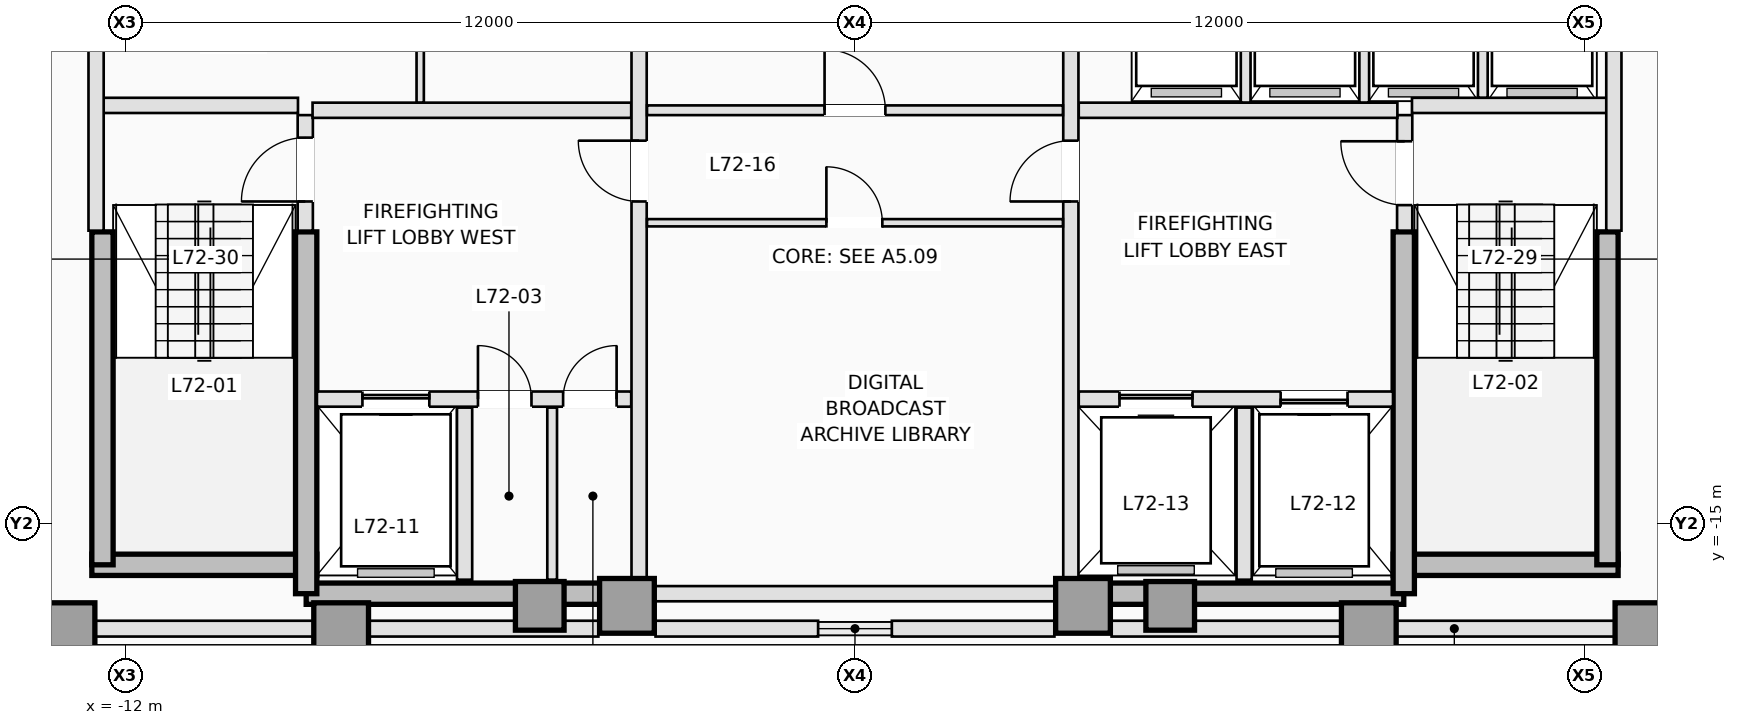
"""IFC4 building model, lengths in metres.
Left out: names, types, materials, properties, quantities, classifications, styles, units other than length and angle.
Written with IfcOpenShell. Run it as: python <this file> out.ifc"""

import sys

from ifc_helpers import new_model, si_unit, direction, frame, frame_2d, origin, origin_2d, place, context, subcontext, project, spatial, rectangle, extrude, element, fill, save


model = new_model("IFC4")
c1 = context("Model", 3, precision=1e-05, world=origin(), true_north=direction((0.0, 1.0)))
c2 = subcontext(c1, "Body", "Model", "MODEL_VIEW")
j1 = project(units=[si_unit("LENGTHUNIT", "METRE"), si_unit("PLANEANGLEUNIT", "RADIAN")], contexts=[c1])
p1 = place(None, origin())
s1 = spatial("IfcSite", under=j1, at=p1, CompositionType="ELEMENT")
p2 = place(p1, origin())
s2 = spatial("IfcBuilding", under=s1, at=p2, CompositionType="ELEMENT")
p3 = place(p2, frame((0.0, 0.0, 260.4)))
s3 = spatial("IfcBuildingStorey", under=s2, at=p3, CompositionType="ELEMENT", Elevation=260.4)
p4 = place(p3, frame((-12.55, -15.675, 0.0), z_axis=(0.0, 0.0, 1.0), x_axis=(1.0, 0.0, 0.0)))
e1 = element("IfcWall", 1, at=p4, inside=s3, PredefinedType="SHEAR", context=c2, shape_type="SweptSolid", body=[
    extrude(rectangle(XDim=3.7, YDim=0.35, at=frame_2d((1.85, 0.0))), origin(), (0.0, 0.0, 1.0), 3.5),
])
for number, where, z_axis, x_axis in (
    (2, (-9.025, -16.15, 0.0), (0.0, 0.0, 1.0), (1.0, 0.0, 0.0)),
    (3, (3.75, -16.15, 0.0), (0.0, 0.0, 1.0), (1.0, 0.0, 0.0)),
):
    element("IfcWall", number, at=place(p3, frame(where, z_axis=z_axis, x_axis=x_axis)), inside=s3, PredefinedType="SHEAR", context=c2, shape_type="SweptSolid", body=[
        extrude(rectangle(XDim=5.275, YDim=0.35, at=frame_2d((2.637, 0.0))), origin(), (0.0, 0.0, 1.0), 3.5),
    ])
p5 = place(p3, frame((8.85, -15.675, 0.0), z_axis=(0.0, 0.0, 1.0), x_axis=(1.0, 0.0, 0.0)))
e4 = element("IfcWall", 4, at=p5, inside=s3, PredefinedType="SHEAR", context=c2, shape_type="SweptSolid", body=[
    extrude(rectangle(XDim=3.7, YDim=0.35, at=frame_2d((1.85, 0.0))), origin(), (0.0, 0.0, 1.0), 3.5),
])
for number, where, z_axis, x_axis in (
    (5, (-12.375, -15.675, 0.0), (0.0, 0.0, 1.0), (0.0, 1.0, 0.0)),
    (6, (12.375, -15.675, 0.0), (0.0, 0.0, 1.0), (0.0, 1.0, 0.0)),
):
    element("IfcWall", number, at=place(p3, frame(where, z_axis=z_axis, x_axis=x_axis)), inside=s3, PredefinedType="SHEAR", context=c2, shape_type="SweptSolid", body=[
        extrude(rectangle(XDim=5.475, YDim=0.35, at=frame_2d((2.738, 0.0))), origin(), (0.0, 0.0, 1.0), 3.5),
    ])
for number, where, z_axis, x_axis in (
    (7, (-9.025, -16.15, 0.0), (0.0, 0.0, 1.0), (0.0, 1.0, 0.0)),
    (8, (9.025, -16.15, 0.0), (0.0, 0.0, 1.0), (0.0, 1.0, 0.0)),
):
    element("IfcWall", number, at=place(p3, frame(where, z_axis=z_axis, x_axis=x_axis)), inside=s3, PredefinedType="SHEAR", context=c2, shape_type="SweptSolid", body=[
        extrude(rectangle(XDim=5.95, YDim=0.35, at=frame_2d((2.975, 0.0))), origin(), (0.0, 0.0, 1.0), 3.5),
    ])
for number, where, z_axis, x_axis in (
    (9, (-12.95, -16.75, 0.0), (0.0, 0.0, 1.0), (1.0, 0.0, 0.0)),
    (10, (-8.45, -16.75, 0.0), (0.0, 0.0, 1.0), (1.0, 0.0, 0.0)),
    (11, (-3.75, -16.35, 0.0), (0.0, 0.0, 1.0), (1.0, 0.0, 0.0)),
    (12, (3.75, -16.35, 0.0), (0.0, 0.0, 1.0), (1.0, 0.0, 0.0)),
    (13, (8.45, -16.75, 0.0), (0.0, 0.0, 1.0), (1.0, 0.0, 0.0)),
    (14, (12.95, -16.75, 0.0), (0.0, 0.0, 1.0), (1.0, 0.0, 0.0)),
):
    element("IfcColumn", number, at=place(p3, frame(where, z_axis=z_axis, x_axis=x_axis)), inside=s3, PredefinedType="COLUMN", context=c2, shape_type="SweptSolid", body=[
        extrude(rectangle(XDim=0.9, YDim=0.9, at=origin_2d()), origin(), (0.0, 0.0, 1.0), 3.5),
    ])
for number, where, z_axis, x_axis in (
    (15, (-5.184, -16.35, 0.0), (0.0, 0.0, 1.0), (0.0, 1.0, 0.0)),
    (16, (5.184, -16.35, 0.0), (0.0, 0.0, 1.0), (0.0, 1.0, 0.0)),
):
    element("IfcColumn", number, at=place(p3, frame(where, z_axis=z_axis, x_axis=x_axis)), inside=s3, PredefinedType="COLUMN", context=c2, shape_type="SweptSolid", body=[
        extrude(rectangle(XDim=0.8, YDim=0.8, at=origin_2d()), origin(), (0.0, 0.0, 1.0), 3.5),
    ])
for number, where, z_axis, x_axis in (
    (17, (15.493, -16.725, 0.0), (0.0, 0.0, 1.0), (-1.0, 0.0, 0.0)),
    (18, (-4.22, -16.725, 0.0), (0.0, 0.0, 1.0), (-1.0, 0.0, 0.0)),
):
    element("IfcWall", number, at=place(p3, frame(where, z_axis=z_axis, x_axis=x_axis)), inside=s3, PredefinedType="STANDARD", context=c2, shape_type="SweptSolid", body=[
        extrude(rectangle(XDim=11.273, YDim=0.26, at=frame_2d((5.636, 0.0))), origin(), (0.0, 0.0, 1.0), 2.79),
    ])
for number, where, z_axis, x_axis in (
    (19, (3.28, -16.725, 0.0), (0.0, 0.0, 1.0), (-1.0, 0.0, 0.0)),
    (20, (-0.606, -16.725, 0.0), (0.0, 0.0, 1.0), (-1.0, 0.0, 0.0)),
):
    element("IfcWall", number, at=place(p3, frame(where, z_axis=z_axis, x_axis=x_axis)), inside=s3, PredefinedType="STANDARD", context=c2, shape_type="SweptSolid", body=[
        extrude(rectangle(XDim=2.674, YDim=0.26, at=frame_2d((1.337, 0.0))), origin(), (0.0, 0.0, 1.0), 3.25),
    ])
p6 = place(p3, frame((-9.04, -10.18, 0.0), z_axis=(0.0, 0.0, 1.0), x_axis=(0.0, 1.0, 0.0)))
e21 = element("IfcWall", 21, at=p6, inside=s3, PredefinedType="PARTITIONING", context=c2, shape_type="SweptSolid", body=[
    extrude(rectangle(XDim=1.9, YDim=0.25, at=frame_2d((0.95, 0.0))), origin(), (0.0, 0.0, 1.0), 3.25),
])
p7 = place(p6, frame((0.48, 0.0, 0.0)))
e22 = element("IfcOpeningElement", 22, at=p7, cuts=e21, PredefinedType="OPENING", context=c2, shape_type="SweptSolid", body=[
    extrude(rectangle(XDim=1.05, YDim=2.15, at=frame_2d((0.525, 1.075))), frame((0.0, 0.135, 0.0), z_axis=(0.0, -1.0, 0.0), x_axis=(1.0, 0.0, 0.0)), (0.0, 0.0, 1.0), 0.27),
])
p8 = place(p3, frame((9.04, -10.18, 0.0), z_axis=(0.0, 0.0, 1.0), x_axis=(0.0, 1.0, 0.0)))
e23 = element("IfcWall", 23, at=p8, inside=s3, PredefinedType="PARTITIONING", context=c2, shape_type="SweptSolid", body=[
    extrude(rectangle(XDim=1.9, YDim=0.25, at=frame_2d((0.95, 0.0))), origin(), (0.0, 0.0, 1.0), 3.25),
])
p9 = place(p8, frame((0.42, 0.0, 0.0)))
e24 = element("IfcOpeningElement", 24, at=p9, cuts=e23, PredefinedType="OPENING", context=c2, shape_type="SweptSolid", body=[
    extrude(rectangle(XDim=1.05, YDim=2.15, at=frame_2d((0.525, 1.075))), frame((0.0, 0.135, 0.0), z_axis=(0.0, -1.0, 0.0), x_axis=(1.0, 0.0, 0.0)), (0.0, 0.0, 1.0), 0.27),
])
for number, where, z_axis, x_axis in (
    (25, (-12.38, -8.12, 0.0), (0.0, 0.0, 1.0), (1.0, 0.0, 0.0)),
    (26, (9.16, -8.12, 0.0), (0.0, 0.0, 1.0), (1.0, 0.0, 0.0)),
):
    element("IfcWall", number, at=place(p3, frame(where, z_axis=z_axis, x_axis=x_axis)), inside=s3, PredefinedType="PARTITIONING", context=c2, shape_type="SweptSolid", body=[
        extrude(rectangle(XDim=3.22, YDim=0.25, at=frame_2d((1.61, 0.0))), origin(), (0.0, 0.0, 1.0), 3.25),
    ])
for number, where, z_axis, x_axis in (
    (27, (-12.48, -10.18, 0.0), (0.0, 0.0, 1.0), (0.0, 1.0, 0.0)),
    (28, (12.48, -10.18, 0.0), (0.0, 0.0, 1.0), (0.0, 1.0, 0.0)),
):
    element("IfcWall", number, at=place(p3, frame(where, z_axis=z_axis, x_axis=x_axis)), inside=s3, PredefinedType="PARTITIONING", context=c2, shape_type="SweptSolid", body=[
        extrude(rectangle(XDim=4.84, YDim=0.25, at=frame_2d((2.42, 0.0))), origin(), (0.0, 0.0, 1.0), 3.25),
    ])
p10 = place(p3, frame((-8.848, -12.95, 0.0), z_axis=(0.0, 0.0, 1.0), x_axis=(1.0, 0.0, 0.0)))
e29 = element("IfcWall", 29, at=p10, inside=s3, PredefinedType="PARTITIONING", context=c2, shape_type="SweptSolid", body=[
    extrude(rectangle(XDim=5.168, YDim=0.25, at=frame_2d((2.584, 0.0))), origin(), (0.0, 0.0, 1.0), 3.25),
])
p11 = place(p10, frame((0.748, 0.0, 0.0)))
e30 = element("IfcOpeningElement", 30, at=p11, cuts=e29, PredefinedType="OPENING", context=c2, shape_type="SweptSolid", body=[
    extrude(rectangle(XDim=1.1, YDim=2.15, at=frame_2d((0.55, 1.075))), frame((0.0, 0.135, 0.0), z_axis=(0.0, -1.0, 0.0), x_axis=(1.0, 0.0, 0.0)), (0.0, 0.0, 1.0), 0.27),
])
p12 = place(p10, frame((2.648, 0.0, 0.0)))
e31 = element("IfcOpeningElement", 31, at=p12, cuts=e29, PredefinedType="OPENING", context=c2, shape_type="SweptSolid", body=[
    extrude(rectangle(XDim=0.88, YDim=2.1, at=frame_2d((0.44, 1.05))), frame((0.0, 0.135, 0.0), z_axis=(0.0, -1.0, 0.0), x_axis=(1.0, 0.0, 0.0)), (0.0, 0.0, 1.0), 0.27),
])
p13 = place(p10, frame((4.048, 0.0, 0.0)))
e32 = element("IfcOpeningElement", 32, at=p13, cuts=e29, PredefinedType="OPENING", context=c2, shape_type="SweptSolid", body=[
    extrude(rectangle(XDim=0.88, YDim=2.1, at=frame_2d((0.44, 1.05))), frame((0.0, 0.135, 0.0), z_axis=(0.0, -1.0, 0.0), x_axis=(1.0, 0.0, 0.0)), (0.0, 0.0, 1.0), 0.27),
])
p14 = place(p3, frame((3.68, -12.95, 0.0), z_axis=(0.0, 0.0, 1.0), x_axis=(1.0, 0.0, 0.0)))
e33 = element("IfcWall", 33, at=p14, inside=s3, PredefinedType="PARTITIONING", context=c2, shape_type="SweptSolid", body=[
    extrude(rectangle(XDim=5.168, YDim=0.25, at=frame_2d((2.584, 0.0))), origin(), (0.0, 0.0, 1.0), 3.25),
])
p15 = place(p14, frame((3.32, 0.0, 0.0)))
e34 = element("IfcOpeningElement", 34, at=p15, cuts=e33, PredefinedType="OPENING", context=c2, shape_type="SweptSolid", body=[
    extrude(rectangle(XDim=1.1, YDim=2.15, at=frame_2d((0.55, 1.075))), frame((0.0, 0.135, 0.0), z_axis=(0.0, -1.0, 0.0), x_axis=(1.0, 0.0, 0.0)), (0.0, 0.0, 1.0), 0.27),
])
p16 = place(p14, frame((0.67, 0.0, 0.0)))
e35 = element("IfcOpeningElement", 35, at=p16, cuts=e33, PredefinedType="OPENING", context=c2, shape_type="SweptSolid", body=[
    extrude(rectangle(XDim=1.2, YDim=2.15, at=frame_2d((0.6, 1.075))), frame((0.0, 0.135, 0.0), z_axis=(0.0, -1.0, 0.0), x_axis=(1.0, 0.0, 0.0)), (0.0, 0.0, 1.0), 0.27),
])
p17 = place(p3, frame((-6.42, -15.92, 0.0), z_axis=(0.0, 0.0, 1.0), x_axis=(0.0, 1.0, 0.0)))
e36 = element("IfcWall", 36, at=p17, inside=s3, PredefinedType="PARTITIONING", context=c2, shape_type="SweptSolid", body=[
    extrude(rectangle(XDim=2.83, YDim=0.25, at=frame_2d((1.415, 0.0))), origin(), (0.0, 0.0, 1.0), 3.25),
])
p18 = place(p3, frame((-4.98, -15.92, 0.0), z_axis=(0.0, 0.0, 1.0), x_axis=(0.0, 1.0, 0.0)))
e37 = element("IfcWall", 37, at=p18, inside=s3, PredefinedType="PARTITIONING", context=c2, shape_type="SweptSolid", body=[
    extrude(rectangle(XDim=2.83, YDim=0.16, at=frame_2d((1.415, 0.0))), origin(), (0.0, 0.0, 1.0), 3.25),
])
p19 = place(p3, frame((6.4, -15.92, 0.0), z_axis=(0.0, 0.0, 1.0), x_axis=(0.0, 1.0, 0.0)))
e38 = element("IfcWall", 38, at=p19, inside=s3, PredefinedType="PARTITIONING", context=c2, shape_type="SweptSolid", body=[
    extrude(rectangle(XDim=2.83, YDim=0.25, at=frame_2d((1.415, 0.0))), origin(), (0.0, 0.0, 1.0), 3.25),
])
for number, where, z_axis, x_axis in (
    (39, (-8.92, -8.2, 0.0), (0.0, 0.0, 1.0), (1.0, 0.0, 0.0)),
    (40, (3.68, -8.2, 0.0), (0.0, 0.0, 1.0), (1.0, 0.0, 0.0)),
):
    element("IfcWall", number, at=place(p3, frame(where, z_axis=z_axis, x_axis=x_axis)), inside=s3, PredefinedType="PARTITIONING", context=c2, shape_type="SweptSolid", body=[
        extrude(rectangle(XDim=5.24, YDim=0.25, at=frame_2d((2.62, 0.0))), origin(), (0.0, 0.0, 1.0), 3.25),
    ])
p20 = place(p3, frame((-3.55, -15.898, 0.0), z_axis=(0.0, 0.0, 1.0), x_axis=(0.0, 1.0, 0.0)))
e41 = element("IfcWall", 41, at=p20, inside=s3, PredefinedType="PARTITIONING", context=c2, shape_type="SweptSolid", body=[
    extrude(rectangle(XDim=10.558, YDim=0.25, at=frame_2d((5.279, 0.0))), origin(), (0.0, 0.0, 1.0), 3.25),
])
p21 = place(p20, frame((6.198, 0.0, 0.0)))
e42 = element("IfcOpeningElement", 42, at=p21, cuts=e41, PredefinedType="OPENING", context=c2, shape_type="SweptSolid", body=[
    extrude(rectangle(XDim=1.0, YDim=2.15, at=frame_2d((0.5, 1.075))), frame((0.0, 0.135, 0.0), z_axis=(0.0, -1.0, 0.0), x_axis=(1.0, 0.0, 0.0)), (0.0, 0.0, 1.0), 0.27),
])
p22 = place(p3, frame((3.55, -15.898, 0.0), z_axis=(0.0, 0.0, 1.0), x_axis=(0.0, 1.0, 0.0)))
e43 = element("IfcWall", 43, at=p22, inside=s3, PredefinedType="PARTITIONING", context=c2, shape_type="SweptSolid", body=[
    extrude(rectangle(XDim=10.558, YDim=0.25, at=frame_2d((5.279, 0.0))), origin(), (0.0, 0.0, 1.0), 3.25),
])
p23 = place(p22, frame((6.198, 0.0, 0.0)))
e44 = element("IfcOpeningElement", 44, at=p23, cuts=e43, PredefinedType="OPENING", context=c2, shape_type="SweptSolid", body=[
    extrude(rectangle(XDim=1.0, YDim=2.15, at=frame_2d((0.5, 1.075))), frame((0.0, 0.135, 0.0), z_axis=(0.0, -1.0, 0.0), x_axis=(1.0, 0.0, 0.0)), (0.0, 0.0, 1.0), 0.27),
])
p24 = place(p3, frame((-7.15, -8.073, 0.0), z_axis=(0.0, 0.0, 1.0), x_axis=(0.0, 1.0, 0.0)))
e45 = element("IfcWall", 45, at=p24, inside=s3, PredefinedType="PARTITIONING", context=c2, shape_type="SweptSolid", body=[
    extrude(rectangle(XDim=2.733, YDim=0.12, at=frame_2d((1.366, 0.0))), origin(), (0.0, 0.0, 1.0), 3.25),
])
for number, where, z_axis, x_axis in (
    (46, (6.425, -8.073, 0.0), (0.0, 0.0, 1.0), (0.0, 1.0, 0.0)),
    (47, (8.375, -8.073, 0.0), (0.0, 0.0, 1.0), (0.0, 1.0, 0.0)),
):
    element("IfcWall", number, at=place(p3, frame(where, z_axis=z_axis, x_axis=x_axis)), inside=s3, PredefinedType="PARTITIONING", context=c2, shape_type="SweptSolid", body=[
        extrude(rectangle(XDim=2.733, YDim=0.16, at=frame_2d((1.366, 0.0))), origin(), (0.0, 0.0, 1.0), 3.25),
    ])
p25 = place(p3, frame((10.325, -7.993, 0.0), z_axis=(0.0, 0.0, 1.0), x_axis=(0.0, 1.0, 0.0)))
e48 = element("IfcWall", 48, at=p25, inside=s3, PredefinedType="PARTITIONING", context=c2, shape_type="SweptSolid", body=[
    extrude(rectangle(XDim=2.653, YDim=0.16, at=frame_2d((1.326, 0.0))), origin(), (0.0, 0.0, 1.0), 3.25),
])
p26 = place(p3, frame((-3.298, -16.15, 0.0), z_axis=(0.0, 0.0, 1.0), x_axis=(1.0, 0.0, 0.0)))
e49 = element("IfcWall", 49, at=p26, inside=s3, PredefinedType="PARTITIONING", context=c2, shape_type="SweptSolid", body=[
    extrude(rectangle(XDim=6.596, YDim=0.25, at=frame_2d((3.298, 0.0))), origin(), (0.0, 0.0, 1.0), 2.844),
])
p27 = place(p3, frame((-3.42, -8.2, 0.0), z_axis=(0.0, 0.0, 1.0), x_axis=(1.0, 0.0, 0.0)))
e50 = element("IfcWall", 50, at=p27, inside=s3, PredefinedType="PARTITIONING", context=c2, shape_type="SweptSolid", body=[
    extrude(rectangle(XDim=6.84, YDim=0.16, at=frame_2d((3.42, 0.0))), origin(), (0.0, 0.0, 1.0), 3.25),
])
p28 = place(p27, frame((2.92, 0.0, 0.0)))
e51 = element("IfcOpeningElement", 51, at=p28, cuts=e50, PredefinedType="OPENING", context=c2, shape_type="SweptSolid", body=[
    extrude(rectangle(XDim=1.0, YDim=2.15, at=frame_2d((0.5, 1.075))), frame((0.0, 0.09, 0.0), z_axis=(0.0, -1.0, 0.0), x_axis=(1.0, 0.0, 0.0)), (0.0, 0.0, 1.0), 0.18),
])
p29 = place(p3, frame((-3.42, -10.05, 0.0), z_axis=(0.0, 0.0, 1.0), x_axis=(1.0, 0.0, 0.0)))
e52 = element("IfcWall", 52, at=p29, inside=s3, PredefinedType="PARTITIONING", context=c2, shape_type="SweptSolid", body=[
    extrude(rectangle(XDim=6.84, YDim=0.12, at=frame_2d((3.42, 0.0))), origin(), (0.0, 0.0, 1.0), 3.25),
])
p30 = place(p29, frame((2.95, 0.0, 0.0)))
e53 = element("IfcOpeningElement", 53, at=p30, cuts=e52, PredefinedType="OPENING", context=c2, shape_type="SweptSolid", body=[
    extrude(rectangle(XDim=0.92, YDim=2.12, at=frame_2d((0.46, 1.06))), frame((0.0, 0.07, 0.0), z_axis=(0.0, -1.0, 0.0), x_axis=(1.0, 0.0, 0.0)), (0.0, 0.0, 1.0), 0.14),
])
p31 = place(p11, origin())
e54 = element("IfcDoor", 54, at=p31, inside=s3, OperationType="SLIDING_TO_LEFT", PredefinedType="DOOR", context=c2, shape_type="SweptSolid", body=[
    extrude(rectangle(XDim=1.1, YDim=2.15, at=frame_2d((0.55, 1.075))), frame((0.0, 0.025, 0.0), z_axis=(0.0, -1.0, 0.0), x_axis=(1.0, 0.0, 0.0)), (0.0, 0.0, 1.0), 0.05),
])
fill(e30, e54)
p32 = place(p15, origin())
e55 = element("IfcDoor", 55, at=p32, inside=s3, OperationType="SLIDING_TO_RIGHT", PredefinedType="DOOR", context=c2, shape_type="SweptSolid", body=[
    extrude(rectangle(XDim=1.1, YDim=2.15, at=frame_2d((0.55, 1.075))), frame((0.0, 0.025, 0.0), z_axis=(0.0, -1.0, 0.0), x_axis=(1.0, 0.0, 0.0)), (0.0, 0.0, 1.0), 0.05),
])
fill(e34, e55)
p33 = place(p16, origin())
e56 = element("IfcDoor", 56, at=p33, inside=s3, OperationType="SLIDING_TO_LEFT", PredefinedType="DOOR", context=c2, shape_type="SweptSolid", body=[
    extrude(rectangle(XDim=1.2, YDim=2.15, at=frame_2d((0.6, 1.075))), frame((0.0, 0.025, 0.0), z_axis=(0.0, -1.0, 0.0), x_axis=(1.0, 0.0, 0.0)), (0.0, 0.0, 1.0), 0.05),
])
fill(e35, e56)
p34 = place(p7, origin())
e57 = element("IfcDoor", 57, at=p34, inside=s3, OperationType="SINGLE_SWING_LEFT", PredefinedType="DOOR", context=c2, shape_type="SweptSolid", body=[
    extrude(rectangle(XDim=1.05, YDim=2.15, at=frame_2d((0.525, 1.075))), frame((0.0, 0.025, 0.0), z_axis=(0.0, -1.0, 0.0), x_axis=(1.0, 0.0, 0.0)), (0.0, 0.0, 1.0), 0.05),
])
fill(e22, e57)
p35 = place(p9, origin())
e58 = element("IfcDoor", 58, at=p35, inside=s3, OperationType="SINGLE_SWING_RIGHT", PredefinedType="DOOR", context=c2, shape_type="SweptSolid", body=[
    extrude(rectangle(XDim=1.05, YDim=2.15, at=frame_2d((0.525, 1.075))), frame((0.0, 0.025, 0.0), z_axis=(0.0, -1.0, 0.0), x_axis=(1.0, 0.0, 0.0)), (0.0, 0.0, 1.0), 0.05),
])
fill(e24, e58)
p36 = place(p12, origin())
e59 = element("IfcDoor", 59, at=p36, inside=s3, OperationType="SINGLE_SWING_LEFT", PredefinedType="TRAPDOOR", context=c2, shape_type="SweptSolid", body=[
    extrude(rectangle(XDim=0.88, YDim=2.1, at=frame_2d((0.44, 1.05))), frame((0.0, 0.025, 0.0), z_axis=(0.0, -1.0, 0.0), x_axis=(1.0, 0.0, 0.0)), (0.0, 0.0, 1.0), 0.05),
])
fill(e31, e59)
p37 = place(p13, origin())
e60 = element("IfcDoor", 60, at=p37, inside=s3, OperationType="SINGLE_SWING_RIGHT", PredefinedType="TRAPDOOR", context=c2, shape_type="SweptSolid", body=[
    extrude(rectangle(XDim=0.88, YDim=2.1, at=frame_2d((0.44, 1.05))), frame((0.0, 0.025, 0.0), z_axis=(0.0, -1.0, 0.0), x_axis=(1.0, 0.0, 0.0)), (0.0, 0.0, 1.0), 0.05),
])
fill(e32, e60)
p38 = place(p21, origin())
e61 = element("IfcDoor", 61, at=p38, inside=s3, OperationType="SINGLE_SWING_RIGHT", PredefinedType="DOOR", context=c2, shape_type="SweptSolid", body=[
    extrude(rectangle(XDim=1.0, YDim=2.15, at=frame_2d((0.5, 1.075))), frame((0.0, 0.025, 0.0), z_axis=(0.0, -1.0, 0.0), x_axis=(1.0, 0.0, 0.0)), (0.0, 0.0, 1.0), 0.05),
])
fill(e42, e61)
p39 = place(p23, origin())
e62 = element("IfcDoor", 62, at=p39, inside=s3, OperationType="SINGLE_SWING_LEFT", PredefinedType="DOOR", context=c2, shape_type="SweptSolid", body=[
    extrude(rectangle(XDim=1.0, YDim=2.15, at=frame_2d((0.5, 1.075))), frame((0.0, 0.025, 0.0), z_axis=(0.0, -1.0, 0.0), x_axis=(1.0, 0.0, 0.0)), (0.0, 0.0, 1.0), 0.05),
])
fill(e44, e62)
p40 = place(p28, origin())
e63 = element("IfcDoor", 63, at=p40, inside=s3, OperationType="SINGLE_SWING_LEFT", PredefinedType="DOOR", context=c2, shape_type="SweptSolid", body=[
    extrude(rectangle(XDim=1.0, YDim=2.15, at=frame_2d((0.5, 1.075))), frame((0.0, 0.025, 0.0), z_axis=(0.0, -1.0, 0.0), x_axis=(1.0, 0.0, 0.0)), (0.0, 0.0, 1.0), 0.05),
])
fill(e51, e63)
p41 = place(p30, origin())
e64 = element("IfcDoor", 64, at=p41, inside=s3, OperationType="SINGLE_SWING_LEFT", PredefinedType="DOOR", context=c2, shape_type="SweptSolid", body=[
    extrude(rectangle(XDim=0.92, YDim=2.12, at=frame_2d((0.46, 1.06))), frame((0.0, 0.025, 0.0), z_axis=(0.0, -1.0, 0.0), x_axis=(1.0, 0.0, 0.0)), (0.0, 0.0, 1.0), 0.05),
])
fill(e53, e64)
save(model, sys.argv[1])
